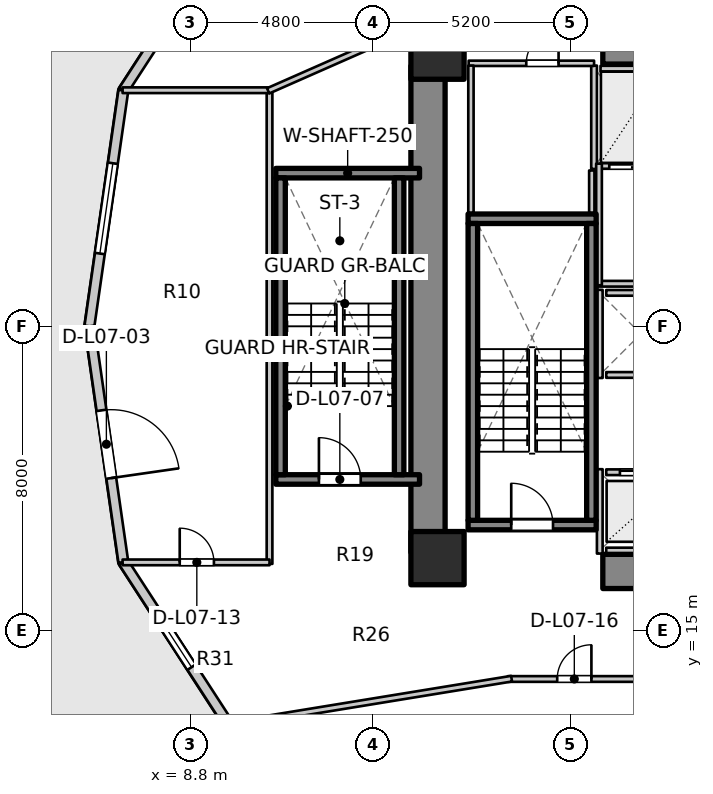
"""IFC4 building model, lengths in metres.
Left out: names, types, materials, properties, quantities, classifications, styles, units other than length and angle.
Written with IfcOpenShell. Run it as: python <this file> out.ifc"""

import sys

from ifc_helpers import new_model, si_unit, direction, frame, frame_2d, origin, origin_2d, place, context, subcontext, project, spatial, rectangle, extrude, element, fill, save


model = new_model("IFC4")
c1 = context("Model", 3, precision=1e-05, world=origin(), true_north=direction((0.0, 1.0)))
c2 = subcontext(c1, "Body", "Model", "MODEL_VIEW")
j1 = project(units=[si_unit("LENGTHUNIT", "METRE"), si_unit("PLANEANGLEUNIT", "RADIAN")], contexts=[c1])
p1 = place(None, origin())
s1 = spatial("IfcSite", under=j1, at=p1, CompositionType="ELEMENT")
p2 = place(p1, origin())
s2 = spatial("IfcBuilding", under=s1, at=p2, CompositionType="ELEMENT")
p3 = place(p2, frame((0.0, 0.0, 27.6)))
s3 = spatial("IfcBuildingStorey", under=s2, at=p3, CompositionType="ELEMENT", Elevation=27.6)
p4 = place(p3, frame((15.05, 17.05, 0.0), z_axis=(0.0, 0.0, 1.0), x_axis=(0.0, 1.0, 0.0)))
e1 = element("IfcWall", 1, at=p4, inside=s3, PredefinedType="SHEAR", context=c2, shape_type="SweptSolid", body=[
    extrude(rectangle(XDim=12.8, YDim=0.9, at=frame_2d((6.4, 0.0))), origin(), (0.0, 0.0, 1.0), 3.1),
])
for number, where, z_axis, x_axis in (
    (2, (19.65, 16.55, 0.0), (0.0, 0.0, 1.0), (1.0, 0.0, 0.0)),
    (3, (19.65, 30.35, 0.0), (0.0, 0.0, 1.0), (1.0, 0.0, 0.0)),
):
    element("IfcWall", number, at=place(p3, frame(where, z_axis=z_axis, x_axis=x_axis)), inside=s3, PredefinedType="SHEAR", context=c2, shape_type="SweptSolid", body=[
        extrude(rectangle(XDim=4.5, YDim=0.9, at=frame_2d((2.25, 0.0))), origin(), (0.0, 0.0, 1.0), 3.1),
    ])
p5 = place(p3, frame((16.105, 17.77, 0.0), z_axis=(0.0, 0.0, 1.0), x_axis=(1.0, 0.0, 0.0)))
e4 = element("IfcWall", 4, at=p5, inside=s3, PredefinedType="SOLIDWALL", context=c2, shape_type="SweptSolid", body=[
    extrude(rectangle(XDim=3.37, YDim=0.25, at=frame_2d((1.685, 0.0))), origin(), (0.0, 0.0, 1.0), 3.1),
])
p6 = place(p5, frame((1.135, 0.0, 0.0)))
e5 = element("IfcOpeningElement", 5, at=p6, cuts=e4, PredefinedType="OPENING", context=c2, shape_type="SweptSolid", body=[
    extrude(rectangle(XDim=1.1, YDim=2.1, at=frame_2d((0.55, 1.05))), frame((0.0, 0.135, 0.0), z_axis=(0.0, -1.0, 0.0), x_axis=(1.0, 0.0, 0.0)), (0.0, 0.0, 1.0), 0.27),
])
p7 = place(p3, frame((16.105, 25.83, 0.0), z_axis=(0.0, 0.0, 1.0), x_axis=(1.0, 0.0, 0.0)))
e6 = element("IfcWall", 6, at=p7, inside=s3, PredefinedType="SOLIDWALL", context=c2, shape_type="SweptSolid", body=[
    extrude(rectangle(XDim=3.37, YDim=0.25, at=frame_2d((1.685, 0.0))), origin(), (0.0, 0.0, 1.0), 3.1),
])
for number, where, z_axis, x_axis in (
    (7, (16.23, 17.895, 0.0), (0.0, 0.0, 1.0), (0.0, 1.0, 0.0)),
    (8, (19.35, 17.895, 0.0), (0.0, 0.0, 1.0), (0.0, 1.0, 0.0)),
):
    element("IfcWall", number, at=place(p3, frame(where, z_axis=z_axis, x_axis=x_axis)), inside=s3, PredefinedType="SOLIDWALL", context=c2, shape_type="SweptSolid", body=[
        extrude(rectangle(XDim=7.81, YDim=0.25, at=frame_2d((3.905, 0.0))), origin(), (0.0, 0.0, 1.0), 3.1),
    ])
p8 = place(p3, frame((11.045, 18.97, 0.0), z_axis=(0.0, 0.0, 1.0), x_axis=(1.0, 0.0, 0.0)))
e9 = element("IfcWall", 9, at=p8, inside=s3, PredefinedType="SOLIDWALL", context=c2, shape_type="SweptSolid", body=[
    extrude(rectangle(XDim=3.782, YDim=0.25, at=frame_2d((1.891, 0.0))), origin(), (0.0, 0.0, 1.0), 3.1),
])
p9 = place(p8, frame((1.135, 0.0, 0.0)))
e10 = element("IfcOpeningElement", 10, at=p9, cuts=e9, PredefinedType="OPENING", context=c2, shape_type="SweptSolid", body=[
    extrude(rectangle(XDim=1.1, YDim=2.1, at=frame_2d((0.55, 1.05))), frame((0.0, 0.135, 0.0), z_axis=(0.0, -1.0, 0.0), x_axis=(1.0, 0.0, 0.0)), (0.0, 0.0, 1.0), 0.27),
])
p10 = place(p3, frame((11.045, 27.03, 0.0), z_axis=(0.0, 0.0, 1.0), x_axis=(1.0, 0.0, 0.0)))
e11 = element("IfcWall", 11, at=p10, inside=s3, PredefinedType="SOLIDWALL", context=c2, shape_type="SweptSolid", body=[
    extrude(rectangle(XDim=3.782, YDim=0.25, at=frame_2d((1.891, 0.0))), origin(), (0.0, 0.0, 1.0), 3.1),
])
for number, where, z_axis, x_axis in (
    (12, (11.17, 19.095, 0.0), (0.0, 0.0, 1.0), (0.0, 1.0, 0.0)),
    (13, (14.29, 19.095, 0.0), (0.0, 0.0, 1.0), (0.0, 1.0, 0.0)),
):
    element("IfcWall", number, at=place(p3, frame(where, z_axis=z_axis, x_axis=x_axis)), inside=s3, PredefinedType="SOLIDWALL", context=c2, shape_type="SweptSolid", body=[
        extrude(rectangle(XDim=7.81, YDim=0.25, at=frame_2d((3.905, 0.0))), origin(), (0.0, 0.0, 1.0), 3.1),
    ])
for number, where, z_axis, x_axis in (
    (14, (15.3, 16.9, 0.0), (0.0, 0.0, 1.0), (1.0, 0.0, 0.0)),
    (15, (15.3, 30.2, 0.0), (0.0, 0.0, 1.0), (1.0, 0.0, 0.0)),
):
    element("IfcColumn", number, at=place(p3, frame(where, z_axis=z_axis, x_axis=x_axis)), inside=s3, PredefinedType="COLUMN", context=c2, shape_type="SweptSolid", body=[
        extrude(rectangle(XDim=1.4, YDim=1.4, at=origin_2d()), origin(), (0.0, 0.0, 1.0), 3.1),
    ])
p11 = place(p3, frame((9.806, 33.476, 0.0), z_axis=(0.0, 0.0, 1.0), x_axis=(-0.544578722263, -0.838709732421, 0.0)))
e16 = element("IfcWall", 16, at=p11, inside=s3, PredefinedType="STANDARD", context=c2, shape_type="SweptSolid", body=[
    extrude(rectangle(XDim=5.092, YDim=0.26, at=frame_2d((2.546, 0.0))), origin(), (0.0, 0.0, 1.0), 2.85),
])
p12 = place(p11, frame((1.796, 0.0, 0.75)))
e17 = element("IfcOpeningElement", 17, at=p12, cuts=e16, PredefinedType="OPENING", context=c2, shape_type="SweptSolid", body=[
    extrude(rectangle(XDim=1.5, YDim=1.6, at=frame_2d((0.75, 0.8))), frame((0.0, 0.14, 0.0), z_axis=(0.0, -1.0, 0.0), x_axis=(1.0, 0.0, 0.0)), (0.0, 0.0, 1.0), 0.28),
])
p13 = place(p3, frame((7.033, 29.205, 0.0), z_axis=(0.0, 0.0, 1.0), x_axis=(-0.142528001686, -0.989790770181, 0.0)))
e18 = element("IfcWall", 18, at=p13, inside=s3, PredefinedType="STANDARD", context=c2, shape_type="SweptSolid", body=[
    extrude(rectangle(XDim=6.269, YDim=0.26, at=frame_2d((3.135, 0.0))), origin(), (0.0, 0.0, 1.0), 2.85),
])
p14 = place(p13, frame((1.935, 0.0, 0.75)))
e19 = element("IfcOpeningElement", 19, at=p14, cuts=e18, PredefinedType="OPENING", context=c2, shape_type="SweptSolid", body=[
    extrude(rectangle(XDim=2.4, YDim=1.7, at=frame_2d((1.2, 0.85))), frame((0.0, 0.14, 0.0), z_axis=(0.0, -1.0, 0.0), x_axis=(1.0, 0.0, 0.0)), (0.0, 0.0, 1.0), 0.28),
])
p15 = place(p3, frame((6.14, 23.0, 0.0), z_axis=(0.0, 0.0, 1.0), x_axis=(0.142528001686, -0.989790770181, 0.0)))
e20 = element("IfcWall", 20, at=p15, inside=s3, PredefinedType="STANDARD", context=c2, shape_type="SweptSolid", body=[
    extrude(rectangle(XDim=6.269, YDim=0.26, at=frame_2d((3.135, 0.0))), origin(), (0.0, 0.0, 1.0), 2.88),
])
p16 = place(p15, frame((2.235, 0.0, 0.0)))
e21 = element("IfcOpeningElement", 21, at=p16, cuts=e20, PredefinedType="OPENING", context=c2, shape_type="SweptSolid", body=[
    extrude(rectangle(XDim=1.8, YDim=2.35, at=frame_2d((0.9, 1.175))), frame((0.0, 0.14, 0.0), z_axis=(0.0, -1.0, 0.0), x_axis=(1.0, 0.0, 0.0)), (0.0, 0.0, 1.0), 0.28),
])
p17 = place(p3, frame((7.033, 16.795, 0.0), z_axis=(0.0, 0.0, 1.0), x_axis=(0.544578722263, -0.838709732421, 0.0)))
e22 = element("IfcWall", 22, at=p17, inside=s3, PredefinedType="STANDARD", context=c2, shape_type="SweptSolid", body=[
    extrude(rectangle(XDim=5.092, YDim=0.26, at=frame_2d((2.546, 0.0))), origin(), (0.0, 0.0, 1.0), 2.85),
])
p18 = place(p17, frame((1.796, 0.0, 0.75)))
e23 = element("IfcOpeningElement", 23, at=p18, cuts=e22, PredefinedType="OPENING", context=c2, shape_type="SweptSolid", body=[
    extrude(rectangle(XDim=1.5, YDim=1.6, at=frame_2d((0.75, 0.8))), frame((0.0, 0.14, 0.0), z_axis=(0.0, -1.0, 0.0), x_axis=(1.0, 0.0, 0.0)), (0.0, 0.0, 1.0), 0.28),
])
p19 = place(p3, frame((19.74, 19.16, 0.0), z_axis=(0.0, 0.0, 1.0), x_axis=(1.0, 0.0, 0.0)))
e24 = element("IfcWall", 24, at=p19, inside=s3, PredefinedType="SOLIDWALL", context=c2, shape_type="SweptSolid", body=[
    extrude(rectangle(XDim=1.82, YDim=0.15, at=frame_2d((0.91, 0.0))), origin(), (0.0, 0.0, 1.0), 2.855),
])
p20 = place(p19, frame((0.36, 0.0, 0.0)))
e25 = element("IfcOpeningElement", 25, at=p20, cuts=e24, PredefinedType="OPENING", context=c2, shape_type="SweptSolid", body=[
    extrude(rectangle(XDim=1.1, YDim=2.1, at=frame_2d((0.55, 1.05))), frame((0.0, 0.085, 0.0), z_axis=(0.0, -1.0, 0.0), x_axis=(1.0, 0.0, 0.0)), (0.0, 0.0, 1.0), 0.17),
])
p21 = place(p3, frame((19.74, 17.1, 0.0), z_axis=(0.0, 0.0, 1.0), x_axis=(1.0, 0.0, 0.0)))
e26 = element("IfcWall", 26, at=p21, inside=s3, PredefinedType="SOLIDWALL", context=c2, shape_type="SweptSolid", body=[
    extrude(rectangle(XDim=1.82, YDim=0.15, at=frame_2d((0.91, 0.0))), origin(), (0.0, 0.0, 1.0), 2.855),
])
p22 = place(p3, frame((19.57, 17.02, 0.0), z_axis=(0.0, 0.0, 1.0), x_axis=(0.0, 1.0, 0.0)))
e27 = element("IfcWall", 27, at=p22, inside=s3, PredefinedType="SOLIDWALL", context=c2, shape_type="SweptSolid", body=[
    extrude(rectangle(XDim=2.22, YDim=0.15, at=frame_2d((1.11, 0.0))), origin(), (0.0, 0.0, 1.0), 2.12),
])
for number, where, z_axis, x_axis in (
    (28, (19.74, 21.72, 0.0), (0.0, 0.0, 1.0), (1.0, 0.0, 0.0)),
    (29, (19.74, 23.88, 0.0), (0.0, 0.0, 1.0), (1.0, 0.0, 0.0)),
):
    element("IfcWall", number, at=place(p3, frame(where, z_axis=z_axis, x_axis=x_axis)), inside=s3, PredefinedType="SOLIDWALL", context=c2, shape_type="SweptSolid", body=[
        extrude(rectangle(XDim=1.82, YDim=0.15, at=frame_2d((0.91, 0.0))), origin(), (0.0, 0.0, 1.0), 2.855),
    ])
p23 = place(p3, frame((19.57, 21.64, 0.0), z_axis=(0.0, 0.0, 1.0), x_axis=(0.0, 1.0, 0.0)))
e30 = element("IfcWall", 30, at=p23, inside=s3, PredefinedType="SOLIDWALL", context=c2, shape_type="SweptSolid", body=[
    extrude(rectangle(XDim=2.32, YDim=0.15, at=frame_2d((1.16, 0.0))), origin(), (0.0, 0.0, 1.0), 2.855),
])
p24 = place(p3, frame((19.59, 27.22, 0.0), z_axis=(0.0, 0.0, 1.0), x_axis=(1.0, 0.0, 0.0)))
e31 = element("IfcWall", 31, at=p24, inside=s3, PredefinedType="SOLIDWALL", context=c2, shape_type="SweptSolid", body=[
    extrude(rectangle(XDim=1.76, YDim=0.15, at=frame_2d((0.88, 0.0))), origin(), (0.0, 0.0, 1.0), 2.855),
])
p25 = place(p24, frame((0.23, 0.0, 0.0)))
e32 = element("IfcOpeningElement", 32, at=p25, cuts=e31, PredefinedType="OPENING", context=c2, shape_type="SweptSolid", body=[
    extrude(rectangle(XDim=1.3, YDim=2.1, at=frame_2d((0.65, 1.05))), frame((0.0, 0.085, 0.0), z_axis=(0.0, -1.0, 0.0), x_axis=(1.0, 0.0, 0.0)), (0.0, 0.0, 1.0), 0.17),
])
p26 = place(p3, frame((19.59, 29.78, 0.0), z_axis=(0.0, 0.0, 1.0), x_axis=(1.0, 0.0, 0.0)))
e33 = element("IfcWall", 33, at=p26, inside=s3, PredefinedType="SOLIDWALL", context=c2, shape_type="SweptSolid", body=[
    extrude(rectangle(XDim=1.76, YDim=0.15, at=frame_2d((0.88, 0.0))), origin(), (0.0, 0.0, 1.0), 2.855),
])
p27 = place(p3, frame((19.42, 27.14, 0.0), z_axis=(0.0, 0.0, 1.0), x_axis=(0.0, 1.0, 0.0)))
e34 = element("IfcWall", 34, at=p27, inside=s3, PredefinedType="SOLIDWALL", context=c2, shape_type="SweptSolid", body=[
    extrude(rectangle(XDim=2.72, YDim=0.15, at=frame_2d((1.36, 0.0))), origin(), (0.0, 0.0, 1.0), 2.855),
])
p28 = place(p3, frame((19.52, 24.12, 0.0), z_axis=(0.0, 0.0, 1.0), x_axis=(1.0, 0.0, 0.0)))
e35 = element("IfcWall", 35, at=p28, inside=s3, PredefinedType="PARTITIONING", context=c2, shape_type="SweptSolid", body=[
    extrude(rectangle(XDim=5.08, YDim=0.15, at=frame_2d((2.54, 0.0))), origin(), (0.0, 0.0, 1.0), 2.12),
])
p29 = place(p3, frame((19.55, 24.08, 0.0), z_axis=(0.0, 0.0, 1.0), x_axis=(0.0, 1.0, 0.0)))
e36 = element("IfcWall", 36, at=p29, inside=s3, PredefinedType="PARTITIONING", context=c2, shape_type="SweptSolid", body=[
    extrude(rectangle(XDim=3.2, YDim=0.15, at=frame_2d((1.6, 0.0))), origin(), (0.0, 0.0, 1.0), 2.855),
])
p30 = place(p3, frame((16.12, 29.92, 0.0), z_axis=(0.0, 0.0, 1.0), x_axis=(1.0, 0.0, 0.0)))
e37 = element("IfcWall", 37, at=p30, inside=s3, PredefinedType="PLUMBINGWALL", context=c2, shape_type="SweptSolid", body=[
    extrude(rectangle(XDim=3.3, YDim=0.14, at=frame_2d((1.65, 0.0))), origin(), (0.0, 0.0, 1.0), 2.855),
])
p31 = place(p30, frame((1.516, 0.0, 0.0)))
e38 = element("IfcOpeningElement", 38, at=p31, cuts=e37, PredefinedType="OPENING", context=c2, shape_type="SweptSolid", body=[
    extrude(rectangle(XDim=0.85, YDim=2.05, at=frame_2d((0.425, 1.025))), frame((0.0, 0.08, 0.0), z_axis=(0.0, -1.0, 0.0), x_axis=(1.0, 0.0, 0.0)), (0.0, 0.0, 1.0), 0.16),
])
p32 = place(p3, frame((16.18, 25.98, 0.0), z_axis=(0.0, 0.0, 1.0), x_axis=(0.0, 1.0, 0.0)))
e39 = element("IfcWall", 39, at=p32, inside=s3, PredefinedType="PLUMBINGWALL", context=c2, shape_type="SweptSolid", body=[
    extrude(rectangle(XDim=3.88, YDim=0.14, at=frame_2d((1.94, 0.0))), origin(), (0.0, 0.0, 1.0), 2.855),
])
p33 = place(p3, frame((19.36, 25.98, 0.0), z_axis=(0.0, 0.0, 1.0), x_axis=(0.0, 1.0, 0.0)))
e40 = element("IfcWall", 40, at=p33, inside=s3, PredefinedType="PLUMBINGWALL", context=c2, shape_type="SweptSolid", body=[
    extrude(rectangle(XDim=1.12, YDim=0.14, at=frame_2d((0.56, 0.0))), origin(), (0.0, 0.0, 1.0), 2.855),
])
p34 = place(p3, frame((10.88, 16.748, 0.0), z_axis=(0.0, 0.0, 1.0), x_axis=(0.0, 1.0, 0.0)))
e41 = element("IfcWall", 41, at=p34, inside=s3, PredefinedType="PARTITIONING", context=c2, shape_type="SweptSolid", body=[
    extrude(rectangle(XDim=12.503, YDim=0.15, at=frame_2d((6.252, 0.0))), origin(), (0.0, 0.0, 1.0), 2.12),
])
p35 = place(p3, frame((7.014, 16.788, 0.0), z_axis=(0.0, 0.0, 1.0), x_axis=(1.0, 0.0, 0.0)))
e42 = element("IfcWall", 42, at=p35, inside=s3, PredefinedType="PARTITIONING", context=c2, shape_type="SweptSolid", body=[
    extrude(rectangle(XDim=3.866, YDim=0.15, at=frame_2d((1.933, 0.0))), origin(), (0.0, 0.0, 1.0), 2.855),
])
p36 = place(p35, frame((1.503, 0.0, 0.0)))
e43 = element("IfcOpeningElement", 43, at=p36, cuts=e42, PredefinedType="OPENING", context=c2, shape_type="SweptSolid", body=[
    extrude(rectangle(XDim=0.9, YDim=2.1, at=frame_2d((0.45, 1.05))), frame((0.0, 0.085, 0.0), z_axis=(0.0, -1.0, 0.0), x_axis=(1.0, 0.0, 0.0)), (0.0, 0.0, 1.0), 0.17),
])
p37 = place(p3, frame((7.014, 29.212, 0.0), z_axis=(0.0, 0.0, 1.0), x_axis=(1.0, 0.0, 0.0)))
e44 = element("IfcWall", 44, at=p37, inside=s3, PredefinedType="PARTITIONING", context=c2, shape_type="SweptSolid", body=[
    extrude(rectangle(XDim=3.866, YDim=0.15, at=frame_2d((1.933, 0.0))), origin(), (0.0, 0.0, 1.0), 2.855),
])
p38 = place(p3, frame((10.844, 29.196, 0.0), z_axis=(0.0, 0.0, 1.0), x_axis=(0.91502756289, 0.403391322604, 0.0)))
e45 = element("IfcWall", 45, at=p38, inside=s3, PredefinedType="PARTITIONING", context=c2, shape_type="SweptSolid", body=[
    extrude(rectangle(XDim=4.637, YDim=0.15, at=frame_2d((2.319, 0.0))), origin(), (0.0, 0.0, 1.0), 2.069),
])
p39 = place(p3, frame((17.15, 13.72, 0.0), z_axis=(0.0, 0.0, 1.0), x_axis=(1.0, 0.0, 0.0)))
e46 = element("IfcWall", 46, at=p39, inside=s3, PredefinedType="PARTITIONING", context=c2, shape_type="SweptSolid", body=[
    extrude(rectangle(XDim=7.52, YDim=0.15, at=frame_2d((3.76, 0.0))), origin(), (0.0, 0.0, 1.0), 2.237),
])
p40 = place(p39, frame((1.3, 0.0, 0.0)))
e47 = element("IfcOpeningElement", 47, at=p40, cuts=e46, PredefinedType="OPENING", context=c2, shape_type="SweptSolid", body=[
    extrude(rectangle(XDim=0.9, YDim=2.1, at=frame_2d((0.45, 1.05))), frame((0.0, 0.085, 0.0), z_axis=(0.0, -1.0, 0.0), x_axis=(1.0, 0.0, 0.0)), (0.0, 0.0, 1.0), 0.17),
])
p41 = place(p3, frame((17.249, 13.728, 0.0), z_axis=(0.0, 0.0, 1.0), x_axis=(-0.98693078372, -0.161144742846, 0.0)))
e48 = element("IfcWall", 48, at=p41, inside=s3, PredefinedType="PARTITIONING", context=c2, shape_type="SweptSolid", body=[
    extrude(rectangle(XDim=7.557, YDim=0.15, at=frame_2d((3.779, 0.0))), origin(), (0.0, 0.0, 1.0), 2.069),
])
p42 = place(p3, frame((27.032, 13.569, 0.0), z_axis=(0.0, 0.0, 1.0), x_axis=(-0.781055486744, -0.624461629428, 0.0)))
e49 = element("IfcWall", 49, at=p42, inside=s3, PredefinedType="PARTITIONING", context=c2, shape_type="SweptSolid", body=[
    extrude(rectangle(XDim=10.843, YDim=0.18, at=frame_2d((5.422, 0.0))), origin(), (0.0, 0.0, 1.0), 2.237),
])
p43 = place(p14, origin())
e50 = element("IfcWindow", 50, at=p43, inside=s3, PartitioningType="SINGLE_PANEL", PredefinedType="WINDOW", context=c2, shape_type="SweptSolid", body=[
    extrude(rectangle(XDim=2.4, YDim=1.7, at=frame_2d((1.2, 0.85))), frame((0.0, 0.03, 0.0), z_axis=(0.0, -1.0, 0.0), x_axis=(1.0, 0.0, 0.0)), (0.0, 0.0, 1.0), 0.06),
])
fill(e19, e50)
p44 = place(p16, origin())
e51 = element("IfcDoor", 51, at=p44, inside=s3, OperationType="SINGLE_SWING_RIGHT", PredefinedType="DOOR", context=c2, shape_type="SweptSolid", body=[
    extrude(rectangle(XDim=1.8, YDim=2.35, at=frame_2d((0.9, 1.175))), frame((0.0, 0.025, 0.0), z_axis=(0.0, -1.0, 0.0), x_axis=(1.0, 0.0, 0.0)), (0.0, 0.0, 1.0), 0.05),
])
fill(e21, e51)
p45 = place(p18, origin())
e52 = element("IfcWindow", 52, at=p45, inside=s3, PartitioningType="SINGLE_PANEL", PredefinedType="WINDOW", context=c2, shape_type="SweptSolid", body=[
    extrude(rectangle(XDim=1.5, YDim=1.6, at=frame_2d((0.75, 0.8))), frame((0.0, 0.03, 0.0), z_axis=(0.0, -1.0, 0.0), x_axis=(1.0, 0.0, 0.0)), (0.0, 0.0, 1.0), 0.06),
])
fill(e23, e52)
p46 = place(p6, origin())
e53 = element("IfcDoor", 53, at=p46, inside=s3, OperationType="SINGLE_SWING_LEFT", PredefinedType="DOOR", context=c2, shape_type="SweptSolid", body=[
    extrude(rectangle(XDim=1.1, YDim=2.1, at=frame_2d((0.55, 1.05))), frame((0.0, 0.025, 0.0), z_axis=(0.0, -1.0, 0.0), x_axis=(1.0, 0.0, 0.0)), (0.0, 0.0, 1.0), 0.05),
])
fill(e5, e53)
p47 = place(p9, origin())
e54 = element("IfcDoor", 54, at=p47, inside=s3, OperationType="SINGLE_SWING_LEFT", PredefinedType="DOOR", context=c2, shape_type="SweptSolid", body=[
    extrude(rectangle(XDim=1.1, YDim=2.1, at=frame_2d((0.55, 1.05))), frame((0.0, 0.025, 0.0), z_axis=(0.0, -1.0, 0.0), x_axis=(1.0, 0.0, 0.0)), (0.0, 0.0, 1.0), 0.05),
])
fill(e10, e54)
p48 = place(p20, origin())
e55 = element("IfcDoor", 55, at=p48, inside=s3, OperationType="DOUBLE_DOOR_SLIDING", PredefinedType="DOOR", context=c2, shape_type="SweptSolid", body=[
    extrude(rectangle(XDim=1.1, YDim=2.1, at=frame_2d((0.55, 1.05))), frame((0.0, 0.025, 0.0), z_axis=(0.0, -1.0, 0.0), x_axis=(1.0, 0.0, 0.0)), (0.0, 0.0, 1.0), 0.05),
])
fill(e25, e55)
p49 = place(p25, origin())
e56 = element("IfcDoor", 56, at=p49, inside=s3, OperationType="DOUBLE_DOOR_SLIDING", PredefinedType="DOOR", context=c2, shape_type="SweptSolid", body=[
    extrude(rectangle(XDim=1.3, YDim=2.1, at=frame_2d((0.65, 1.05))), frame((0.0, 0.025, 0.0), z_axis=(0.0, -1.0, 0.0), x_axis=(1.0, 0.0, 0.0)), (0.0, 0.0, 1.0), 0.05),
])
fill(e32, e56)
p50 = place(p31, origin())
e57 = element("IfcDoor", 57, at=p50, inside=s3, OperationType="SINGLE_SWING_RIGHT", PredefinedType="DOOR", context=c2, shape_type="SweptSolid", body=[
    extrude(rectangle(XDim=0.85, YDim=2.05, at=frame_2d((0.425, 1.025))), frame((0.0, 0.025, 0.0), z_axis=(0.0, -1.0, 0.0), x_axis=(1.0, 0.0, 0.0)), (0.0, 0.0, 1.0), 0.05),
])
fill(e38, e57)
p51 = place(p36, origin())
e58 = element("IfcDoor", 58, at=p51, inside=s3, OperationType="SINGLE_SWING_LEFT", PredefinedType="DOOR", context=c2, shape_type="SweptSolid", body=[
    extrude(rectangle(XDim=0.9, YDim=2.1, at=frame_2d((0.45, 1.05))), frame((0.0, 0.025, 0.0), z_axis=(0.0, -1.0, 0.0), x_axis=(1.0, 0.0, 0.0)), (0.0, 0.0, 1.0), 0.05),
])
fill(e43, e58)
p52 = place(p40, origin())
e59 = element("IfcDoor", 59, at=p52, inside=s3, OperationType="SINGLE_SWING_RIGHT", PredefinedType="DOOR", context=c2, shape_type="SweptSolid", body=[
    extrude(rectangle(XDim=0.9, YDim=2.1, at=frame_2d((0.45, 1.05))), frame((0.0, 0.025, 0.0), z_axis=(0.0, -1.0, 0.0), x_axis=(1.0, 0.0, 0.0)), (0.0, 0.0, 1.0), 0.05),
])
fill(e47, e59)
save(model, sys.argv[1])
